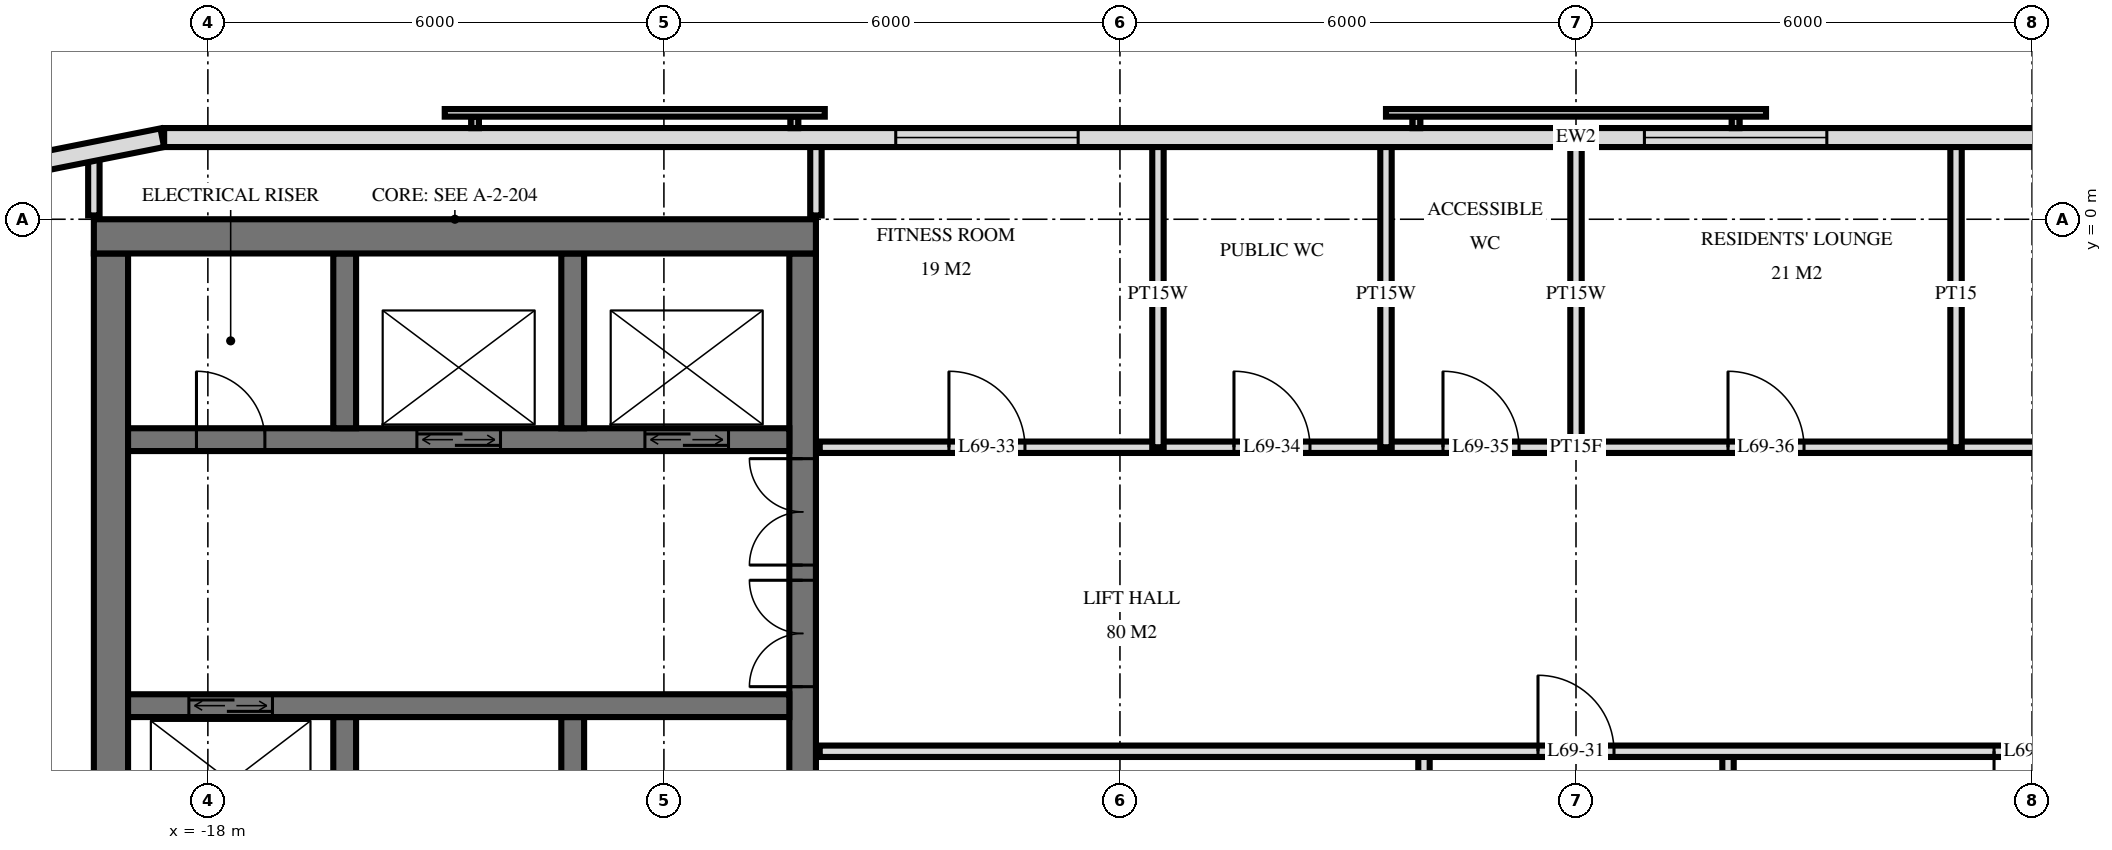
"""IFC4 building model, lengths in metres.
Left out: names, types, materials, properties, quantities, classifications, styles, units other than length and angle.
Written with IfcOpenShell. Run it as: python <this file> out.ifc"""

import sys

from ifc_helpers import new_model, si_unit, direction, frame, frame_2d, origin, place, context, subcontext, project, spatial, rectangle, extrude, element, fill, save


model = new_model("IFC4")
c1 = context("Model", 3, precision=1e-05, world=origin(), true_north=direction((0.0, 1.0)))
c2 = subcontext(c1, "Body", "Model", "MODEL_VIEW")
j1 = project(units=[si_unit("LENGTHUNIT", "METRE"), si_unit("PLANEANGLEUNIT", "RADIAN")], contexts=[c1])
p1 = place(None, origin())
s1 = spatial("IfcSite", under=j1, at=p1, CompositionType="ELEMENT")
p2 = place(p1, origin())
s2 = spatial("IfcBuilding", under=s1, at=p2, CompositionType="ELEMENT")
p3 = place(p2, frame((0.0, 0.0, 263.1)))
s3 = spatial("IfcBuildingStorey", under=s2, at=p3, CompositionType="ELEMENT", Elevation=263.1)
p4 = place(p3, frame((-19.5, -0.225, 0.0), z_axis=(0.0, 0.0, 1.0), x_axis=(1.0, 0.0, 0.0)))
e1 = element("IfcWall", 1, at=p4, inside=s3, PredefinedType="SHEAR", context=c2, shape_type="SweptSolid", body=[
    extrude(rectangle(XDim=9.5, YDim=0.45, at=frame_2d((4.75, 0.0))), origin(), (0.0, 0.0, 1.0), 3.5),
])
p5 = place(p3, frame((-10.175, -14.55, 0.0), z_axis=(0.0, 0.0, 1.0), x_axis=(0.0, 1.0, 0.0)))
e2 = element("IfcWall", 2, at=p5, inside=s3, PredefinedType="SHEAR", context=c2, shape_type="SweptSolid", body=[
    extrude(rectangle(XDim=14.1, YDim=0.35, at=frame_2d((7.05, 0.0))), origin(), (0.0, 0.0, 1.0), 3.5),
])
p6 = place(p5, frame((8.4, 0.0, 0.0)))
e3 = element("IfcOpeningElement", 3, at=p6, cuts=e2, PredefinedType="OPENING", context=c2, shape_type="SweptSolid", body=[
    extrude(rectangle(XDim=1.4, YDim=2.4, at=frame_2d((0.7, 1.2))), frame((0.0, 0.185, 0.0), z_axis=(0.0, -1.0, 0.0), x_axis=(1.0, 0.0, 0.0)), (0.0, 0.0, 1.0), 0.37),
])
p7 = place(p5, frame((10.0, 0.0, 0.0)))
e4 = element("IfcOpeningElement", 4, at=p7, cuts=e2, PredefinedType="OPENING", context=c2, shape_type="SweptSolid", body=[
    extrude(rectangle(XDim=1.4, YDim=2.4, at=frame_2d((0.7, 1.2))), frame((0.0, 0.185, 0.0), z_axis=(0.0, -1.0, 0.0), x_axis=(1.0, 0.0, 0.0)), (0.0, 0.0, 1.0), 0.37),
])
p8 = place(p5, frame((4.0, 0.0, 0.0)))
e5 = element("IfcOpeningElement", 5, at=p8, cuts=e2, PredefinedType="OPENING", context=c2, shape_type="SweptSolid", body=[
    extrude(rectangle(XDim=1.2, YDim=2.1, at=frame_2d((0.6, 1.05))), frame((0.0, 0.185, 0.0), z_axis=(0.0, -1.0, 0.0), x_axis=(1.0, 0.0, 0.0)), (0.0, 0.0, 1.0), 0.37),
])
p9 = place(p3, frame((-19.275, -14.55, 0.0), z_axis=(0.0, 0.0, 1.0), x_axis=(0.0, 1.0, 0.0)))
e6 = element("IfcWall", 6, at=p9, inside=s3, PredefinedType="SHEAR", context=c2, shape_type="SweptSolid", body=[
    extrude(rectangle(XDim=14.1, YDim=0.45, at=frame_2d((7.05, 0.0))), origin(), (0.0, 0.0, 1.0), 3.5),
])
p10 = place(p3, frame((-19.05, -2.9, 0.0), z_axis=(0.0, 0.0, 1.0), x_axis=(1.0, 0.0, 0.0)))
e7 = element("IfcWall", 7, at=p10, inside=s3, PredefinedType="SHEAR", context=c2, shape_type="SweptSolid", body=[
    extrude(rectangle(XDim=8.7, YDim=0.3, at=frame_2d((4.35, 0.0))), origin(), (0.0, 0.0, 1.0), 3.5),
])
p11 = place(p10, frame((6.8, 0.0, 0.0)))
e8 = element("IfcOpeningElement", 8, at=p11, cuts=e7, PredefinedType="OPENING", context=c2, shape_type="SweptSolid", body=[
    extrude(rectangle(XDim=1.1, YDim=2.1, at=frame_2d((0.55, 1.05))), frame((0.0, 0.16, 0.0), z_axis=(0.0, -1.0, 0.0), x_axis=(1.0, 0.0, 0.0)), (0.0, 0.0, 1.0), 0.32),
])
p12 = place(p10, frame((3.8, 0.0, 0.0)))
e9 = element("IfcOpeningElement", 9, at=p12, cuts=e7, PredefinedType="OPENING", context=c2, shape_type="SweptSolid", body=[
    extrude(rectangle(XDim=1.1, YDim=2.1, at=frame_2d((0.55, 1.05))), frame((0.0, 0.16, 0.0), z_axis=(0.0, -1.0, 0.0), x_axis=(1.0, 0.0, 0.0)), (0.0, 0.0, 1.0), 0.32),
])
p13 = place(p10, frame((0.9, 0.0, 0.0)))
e10 = element("IfcOpeningElement", 10, at=p13, cuts=e7, PredefinedType="OPENING", context=c2, shape_type="SweptSolid", body=[
    extrude(rectangle(XDim=0.9, YDim=2.1, at=frame_2d((0.45, 1.05))), frame((0.0, 0.16, 0.0), z_axis=(0.0, -1.0, 0.0), x_axis=(1.0, 0.0, 0.0)), (0.0, 0.0, 1.0), 0.32),
])
p14 = place(p3, frame((-19.05, -6.4, 0.0), z_axis=(0.0, 0.0, 1.0), x_axis=(1.0, 0.0, 0.0)))
e11 = element("IfcWall", 11, at=p14, inside=s3, PredefinedType="SHEAR", context=c2, shape_type="SweptSolid", body=[
    extrude(rectangle(XDim=8.7, YDim=0.3, at=frame_2d((4.35, 0.0))), origin(), (0.0, 0.0, 1.0), 3.5),
])
p15 = place(p14, frame((0.8, 0.0, 0.0)))
e12 = element("IfcOpeningElement", 12, at=p15, cuts=e11, PredefinedType="OPENING", context=c2, shape_type="SweptSolid", body=[
    extrude(rectangle(XDim=1.1, YDim=2.1, at=frame_2d((0.55, 1.05))), frame((0.0, 0.16, 0.0), z_axis=(0.0, -1.0, 0.0), x_axis=(1.0, 0.0, 0.0)), (0.0, 0.0, 1.0), 0.32),
])
for number, where, z_axis, x_axis in (
    (13, (-13.2, -2.75, 0.0), (0.0, 0.0, 1.0), (0.0, 1.0, 0.0)),
    (14, (-13.2, -8.85, 0.0), (0.0, 0.0, 1.0), (0.0, 1.0, 0.0)),
    (15, (-16.2, -2.75, 0.0), (0.0, 0.0, 1.0), (0.0, 1.0, 0.0)),
    (16, (-16.2, -8.85, 0.0), (0.0, 0.0, 1.0), (0.0, 1.0, 0.0)),
):
    element("IfcWall", number, at=place(p3, frame(where, z_axis=z_axis, x_axis=x_axis)), inside=s3, PredefinedType="SHEAR", context=c2, shape_type="SweptSolid", body=[
        extrude(rectangle(XDim=2.3, YDim=0.3, at=frame_2d((1.15, 0.0))), origin(), (0.0, 0.0, 1.0), 3.5),
    ])
p16 = place(p3, frame((18.575, 1.075, 0.0), z_axis=(0.0, 0.0, 1.0), x_axis=(-1.0, 0.0, 0.0)))
e17 = element("IfcWall", 17, at=p16, inside=s3, PredefinedType="SOLIDWALL", context=c2, shape_type="SweptSolid", body=[
    extrude(rectangle(XDim=37.151, YDim=0.25, at=frame_2d((18.575, 0.0))), origin(), (0.0, 0.0, 1.0), 3.22),
])
p17 = place(p16, frame((9.275, 0.0, 0.9)))
e18 = element("IfcOpeningElement", 18, at=p17, cuts=e17, PredefinedType="OPENING", context=c2, shape_type="SweptSolid", body=[
    extrude(rectangle(XDim=2.4, YDim=1.5, at=frame_2d((1.2, 0.75))), frame((0.0, 0.135, 0.0), z_axis=(0.0, -1.0, 0.0), x_axis=(1.0, 0.0, 0.0)), (0.0, 0.0, 1.0), 0.27),
])
p18 = place(p16, frame((15.275, 0.0, 0.9)))
e19 = element("IfcOpeningElement", 19, at=p18, cuts=e17, PredefinedType="OPENING", context=c2, shape_type="SweptSolid", body=[
    extrude(rectangle(XDim=2.4, YDim=1.5, at=frame_2d((1.2, 0.75))), frame((0.0, 0.135, 0.0), z_axis=(0.0, -1.0, 0.0), x_axis=(1.0, 0.0, 0.0)), (0.0, 0.0, 1.0), 0.27),
])
p19 = place(p16, frame((25.125, 0.0, 0.9)))
e20 = element("IfcOpeningElement", 20, at=p19, cuts=e17, PredefinedType="OPENING", context=c2, shape_type="SweptSolid", body=[
    extrude(rectangle(XDim=2.4, YDim=1.5, at=frame_2d((1.2, 0.75))), frame((0.0, 0.135, 0.0), z_axis=(0.0, -1.0, 0.0), x_axis=(1.0, 0.0, 0.0)), (0.0, 0.0, 1.0), 0.27),
])
p20 = place(p3, frame((-18.6, 1.073, 0.0), z_axis=(0.0, 0.0, 1.0), x_axis=(-0.980797896849, -0.195026884138, 0.0)))
e21 = element("IfcWall", 21, at=p20, inside=s3, PredefinedType="SOLIDWALL", context=c2, shape_type="SweptSolid", body=[
    extrude(rectangle(XDim=1.681, YDim=0.25, at=frame_2d((0.841, 0.0))), origin(), (0.0, 0.0, 1.0), 3.22),
])
p21 = place(p3, frame((5.0, -3.0, 0.0), z_axis=(0.0, 0.0, 1.0), x_axis=(0.0, 1.0, 0.0)))
e22 = element("IfcWall", 22, at=p21, inside=s3, PredefinedType="PARTITIONING", context=c2, shape_type="SweptSolid", body=[
    extrude(rectangle(XDim=4.02, YDim=0.15, at=frame_2d((2.01, 0.0))), origin(), (0.0, 0.0, 1.0), 3.22),
])
p22 = place(p3, frame((2.0, -11.0, 0.0), z_axis=(0.0, 0.0, 1.0), x_axis=(0.0, 1.0, 0.0)))
e23 = element("IfcWall", 23, at=p22, inside=s3, PredefinedType="PARTITIONING", context=c2, shape_type="SweptSolid", body=[
    extrude(rectangle(XDim=4.0, YDim=0.15, at=frame_2d((2.0, 0.0))), origin(), (0.0, 0.0, 1.0), 3.22),
])
p23 = place(p3, frame((0.0, -3.0, 0.0), z_axis=(0.0, 0.0, 1.0), x_axis=(0.0, 1.0, 0.0)))
e24 = element("IfcWall", 24, at=p23, inside=s3, PredefinedType="PLUMBINGWALL", context=c2, shape_type="SweptSolid", body=[
    extrude(rectangle(XDim=4.02, YDim=0.15, at=frame_2d((2.01, 0.0))), origin(), (0.0, 0.0, 1.0), 3.22),
])
p24 = place(p3, frame((-2.0, -11.0, 0.0), z_axis=(0.0, 0.0, 1.0), x_axis=(0.0, 1.0, 0.0)))
e25 = element("IfcWall", 25, at=p24, inside=s3, PredefinedType="PARTITIONING", context=c2, shape_type="SweptSolid", body=[
    extrude(rectangle(XDim=4.0, YDim=0.15, at=frame_2d((2.0, 0.0))), origin(), (0.0, 0.0, 1.0), 3.22),
])
for number, where, z_axis, x_axis in (
    (26, (-2.5, -3.0, 0.0), (0.0, 0.0, 1.0), (0.0, 1.0, 0.0)),
    (27, (-5.5, -3.0, 0.0), (0.0, 0.0, 1.0), (0.0, 1.0, 0.0)),
):
    element("IfcWall", number, at=place(p3, frame(where, z_axis=z_axis, x_axis=x_axis)), inside=s3, PredefinedType="PLUMBINGWALL", context=c2, shape_type="SweptSolid", body=[
        extrude(rectangle(XDim=4.02, YDim=0.15, at=frame_2d((2.01, 0.0))), origin(), (0.0, 0.0, 1.0), 3.22),
    ])
p25 = place(p3, frame((-10.0, 0.05, 0.0), z_axis=(0.0, 0.0, 1.0), x_axis=(0.0, 1.0, 0.0)))
e28 = element("IfcWall", 28, at=p25, inside=s3, PredefinedType="PARTITIONING", context=c2, shape_type="SweptSolid", body=[
    extrude(rectangle(XDim=0.97, YDim=0.15, at=frame_2d((0.485, 0.0))), origin(), (0.0, 0.0, 1.0), 3.22),
])
p26 = place(p3, frame((-19.5, 0.05, 0.0), z_axis=(0.0, 0.0, 1.0), x_axis=(0.0, 1.0, 0.0)))
e29 = element("IfcWall", 29, at=p26, inside=s3, PredefinedType="PARTITIONING", context=c2, shape_type="SweptSolid", body=[
    extrude(rectangle(XDim=0.787, YDim=0.15, at=frame_2d((0.394, 0.0))), origin(), (0.0, 0.0, 1.0), 3.22),
])
p27 = place(p3, frame((-9.95, -7.0, 0.0), z_axis=(0.0, 0.0, 1.0), x_axis=(1.0, 0.0, 0.0)))
e30 = element("IfcWall", 30, at=p27, inside=s3, PredefinedType="PARTITIONING", context=c2, shape_type="SweptSolid", body=[
    extrude(rectangle(XDim=19.9, YDim=0.15, at=frame_2d((9.95, 0.0))), origin(), (0.0, 0.0, 1.0), 3.22),
])
p28 = place(p27, frame((9.45, 0.0, 0.0)))
e31 = element("IfcOpeningElement", 31, at=p28, cuts=e30, PredefinedType="OPENING", context=c2, shape_type="SweptSolid", body=[
    extrude(rectangle(XDim=1.0, YDim=2.1, at=frame_2d((0.5, 1.05))), frame((0.0, 0.085, 0.0), z_axis=(0.0, -1.0, 0.0), x_axis=(1.0, 0.0, 0.0)), (0.0, 0.0, 1.0), 0.17),
])
p29 = place(p27, frame((15.45, 0.0, 0.0)))
e32 = element("IfcOpeningElement", 32, at=p29, cuts=e30, PredefinedType="OPENING", context=c2, shape_type="SweptSolid", body=[
    extrude(rectangle(XDim=1.0, YDim=2.1, at=frame_2d((0.5, 1.05))), frame((0.0, 0.085, 0.0), z_axis=(0.0, -1.0, 0.0), x_axis=(1.0, 0.0, 0.0)), (0.0, 0.0, 1.0), 0.17),
])
p30 = place(p3, frame((-9.95, -3.0, 0.0), z_axis=(0.0, 0.0, 1.0), x_axis=(1.0, 0.0, 0.0)))
e33 = element("IfcWall", 33, at=p30, inside=s3, PredefinedType="PARTITIONING", context=c2, shape_type="SweptSolid", body=[
    extrude(rectangle(XDim=19.9, YDim=0.15, at=frame_2d((9.95, 0.0))), origin(), (0.0, 0.0, 1.0), 3.22),
])
p31 = place(p30, frame((1.7, 0.0, 0.0)))
e34 = element("IfcOpeningElement", 34, at=p31, cuts=e33, PredefinedType="OPENING", context=c2, shape_type="SweptSolid", body=[
    extrude(rectangle(XDim=1.0, YDim=2.1, at=frame_2d((0.5, 1.05))), frame((0.0, 0.085, 0.0), z_axis=(0.0, -1.0, 0.0), x_axis=(1.0, 0.0, 0.0)), (0.0, 0.0, 1.0), 0.17),
])
p32 = place(p30, frame((5.45, 0.0, 0.0)))
e35 = element("IfcOpeningElement", 35, at=p32, cuts=e33, PredefinedType="OPENING", context=c2, shape_type="SweptSolid", body=[
    extrude(rectangle(XDim=1.0, YDim=2.1, at=frame_2d((0.5, 1.05))), frame((0.0, 0.085, 0.0), z_axis=(0.0, -1.0, 0.0), x_axis=(1.0, 0.0, 0.0)), (0.0, 0.0, 1.0), 0.17),
])
p33 = place(p30, frame((8.2, 0.0, 0.0)))
e36 = element("IfcOpeningElement", 36, at=p33, cuts=e33, PredefinedType="OPENING", context=c2, shape_type="SweptSolid", body=[
    extrude(rectangle(XDim=1.0, YDim=2.1, at=frame_2d((0.5, 1.05))), frame((0.0, 0.085, 0.0), z_axis=(0.0, -1.0, 0.0), x_axis=(1.0, 0.0, 0.0)), (0.0, 0.0, 1.0), 0.17),
])
p34 = place(p30, frame((11.95, 0.0, 0.0)))
e37 = element("IfcOpeningElement", 37, at=p34, cuts=e33, PredefinedType="OPENING", context=c2, shape_type="SweptSolid", body=[
    extrude(rectangle(XDim=1.0, YDim=2.1, at=frame_2d((0.5, 1.05))), frame((0.0, 0.085, 0.0), z_axis=(0.0, -1.0, 0.0), x_axis=(1.0, 0.0, 0.0)), (0.0, 0.0, 1.0), 0.17),
])
p35 = place(p30, frame((16.95, 0.0, 0.0)))
e38 = element("IfcOpeningElement", 38, at=p35, cuts=e33, PredefinedType="OPENING", context=c2, shape_type="SweptSolid", body=[
    extrude(rectangle(XDim=1.0, YDim=2.1, at=frame_2d((0.5, 1.05))), frame((0.0, 0.085, 0.0), z_axis=(0.0, -1.0, 0.0), x_axis=(1.0, 0.0, 0.0)), (0.0, 0.0, 1.0), 0.17),
])
p36 = place(p18, origin())
e39 = element("IfcWindow", 39, at=p36, inside=s3, PartitioningType="SINGLE_PANEL", PredefinedType="WINDOW", context=c2, shape_type="SweptSolid", body=[
    extrude(rectangle(XDim=2.4, YDim=1.5, at=frame_2d((1.2, 0.75))), frame((0.0, 0.03, 0.0), z_axis=(0.0, -1.0, 0.0), x_axis=(1.0, 0.0, 0.0)), (0.0, 0.0, 1.0), 0.06),
])
fill(e19, e39)
p37 = place(p19, origin())
e40 = element("IfcWindow", 40, at=p37, inside=s3, PartitioningType="SINGLE_PANEL", PredefinedType="WINDOW", context=c2, shape_type="SweptSolid", body=[
    extrude(rectangle(XDim=2.4, YDim=1.5, at=frame_2d((1.2, 0.75))), frame((0.0, 0.03, 0.0), z_axis=(0.0, -1.0, 0.0), x_axis=(1.0, 0.0, 0.0)), (0.0, 0.0, 1.0), 0.06),
])
fill(e20, e40)
p38 = place(p11, origin())
e41 = element("IfcDoor", 41, at=p38, inside=s3, OperationType="DOUBLE_DOOR_SLIDING", PredefinedType="USERDEFINED", context=c2, shape_type="SweptSolid", body=[
    extrude(rectangle(XDim=1.1, YDim=2.1, at=frame_2d((0.55, 1.05))), frame((0.0, 0.025, 0.0), z_axis=(0.0, -1.0, 0.0), x_axis=(1.0, 0.0, 0.0)), (0.0, 0.0, 1.0), 0.05),
])
fill(e8, e41)
p39 = place(p12, origin())
e42 = element("IfcDoor", 42, at=p39, inside=s3, OperationType="DOUBLE_DOOR_SLIDING", PredefinedType="USERDEFINED", context=c2, shape_type="SweptSolid", body=[
    extrude(rectangle(XDim=1.1, YDim=2.1, at=frame_2d((0.55, 1.05))), frame((0.0, 0.025, 0.0), z_axis=(0.0, -1.0, 0.0), x_axis=(1.0, 0.0, 0.0)), (0.0, 0.0, 1.0), 0.05),
])
fill(e9, e42)
p40 = place(p15, origin())
e43 = element("IfcDoor", 43, at=p40, inside=s3, OperationType="DOUBLE_DOOR_SLIDING", PredefinedType="USERDEFINED", context=c2, shape_type="SweptSolid", body=[
    extrude(rectangle(XDim=1.1, YDim=2.1, at=frame_2d((0.55, 1.05))), frame((0.0, 0.025, 0.0), z_axis=(0.0, -1.0, 0.0), x_axis=(1.0, 0.0, 0.0)), (0.0, 0.0, 1.0), 0.05),
])
fill(e12, e43)
p41 = place(p6, origin())
e44 = element("IfcDoor", 44, at=p41, inside=s3, OperationType="DOUBLE_DOOR_SINGLE_SWING", PredefinedType="DOOR", context=c2, shape_type="SweptSolid", body=[
    extrude(rectangle(XDim=1.4, YDim=2.4, at=frame_2d((0.7, 1.2))), frame((0.0, 0.025, 0.0), z_axis=(0.0, -1.0, 0.0), x_axis=(1.0, 0.0, 0.0)), (0.0, 0.0, 1.0), 0.05),
])
fill(e3, e44)
p42 = place(p7, origin())
e45 = element("IfcDoor", 45, at=p42, inside=s3, OperationType="DOUBLE_DOOR_SINGLE_SWING", PredefinedType="DOOR", context=c2, shape_type="SweptSolid", body=[
    extrude(rectangle(XDim=1.4, YDim=2.4, at=frame_2d((0.7, 1.2))), frame((0.0, 0.025, 0.0), z_axis=(0.0, -1.0, 0.0), x_axis=(1.0, 0.0, 0.0)), (0.0, 0.0, 1.0), 0.05),
])
fill(e4, e45)
p43 = place(p13, origin())
e46 = element("IfcDoor", 46, at=p43, inside=s3, OperationType="SINGLE_SWING_RIGHT", PredefinedType="DOOR", context=c2, shape_type="SweptSolid", body=[
    extrude(rectangle(XDim=0.9, YDim=2.1, at=frame_2d((0.45, 1.05))), frame((0.0, 0.025, 0.0), z_axis=(0.0, -1.0, 0.0), x_axis=(1.0, 0.0, 0.0)), (0.0, 0.0, 1.0), 0.05),
])
fill(e10, e46)
p44 = place(p28, origin())
e47 = element("IfcDoor", 47, at=p44, inside=s3, OperationType="SINGLE_SWING_RIGHT", PredefinedType="DOOR", context=c2, shape_type="SweptSolid", body=[
    extrude(rectangle(XDim=1.0, YDim=2.1, at=frame_2d((0.5, 1.05))), frame((0.0, 0.025, 0.0), z_axis=(0.0, -1.0, 0.0), x_axis=(1.0, 0.0, 0.0)), (0.0, 0.0, 1.0), 0.05),
])
fill(e31, e47)
p45 = place(p29, frame((0.5, 0.0, 0.0), z_axis=(0.0, 0.0, 1.0), x_axis=(-1.0, 0.0, 0.0)))
e48 = element("IfcDoor", 48, at=p45, inside=s3, OperationType="SINGLE_SWING_LEFT", PredefinedType="DOOR", context=c2, shape_type="SweptSolid", body=[
    extrude(rectangle(XDim=1.0, YDim=2.1, at=frame_2d((0.0, 1.05))), frame((0.0, -0.025, 0.0), z_axis=(0.0, 1.0, 0.0), x_axis=(-1.0, 0.0, 0.0)), (0.0, 0.0, 1.0), 0.05),
])
fill(e32, e48)
p46 = place(p31, origin())
e49 = element("IfcDoor", 49, at=p46, inside=s3, OperationType="SINGLE_SWING_RIGHT", PredefinedType="DOOR", context=c2, shape_type="SweptSolid", body=[
    extrude(rectangle(XDim=1.0, YDim=2.1, at=frame_2d((0.5, 1.05))), frame((0.0, 0.025, 0.0), z_axis=(0.0, -1.0, 0.0), x_axis=(1.0, 0.0, 0.0)), (0.0, 0.0, 1.0), 0.05),
])
fill(e34, e49)
p47 = place(p32, origin())
e50 = element("IfcDoor", 50, at=p47, inside=s3, OperationType="SINGLE_SWING_RIGHT", PredefinedType="DOOR", context=c2, shape_type="SweptSolid", body=[
    extrude(rectangle(XDim=1.0, YDim=2.1, at=frame_2d((0.5, 1.05))), frame((0.0, 0.025, 0.0), z_axis=(0.0, -1.0, 0.0), x_axis=(1.0, 0.0, 0.0)), (0.0, 0.0, 1.0), 0.05),
])
fill(e35, e50)
p48 = place(p33, origin())
e51 = element("IfcDoor", 51, at=p48, inside=s3, OperationType="SINGLE_SWING_RIGHT", PredefinedType="DOOR", context=c2, shape_type="SweptSolid", body=[
    extrude(rectangle(XDim=1.0, YDim=2.1, at=frame_2d((0.5, 1.05))), frame((0.0, 0.025, 0.0), z_axis=(0.0, -1.0, 0.0), x_axis=(1.0, 0.0, 0.0)), (0.0, 0.0, 1.0), 0.05),
])
fill(e36, e51)
p49 = place(p34, origin())
e52 = element("IfcDoor", 52, at=p49, inside=s3, OperationType="SINGLE_SWING_RIGHT", PredefinedType="DOOR", context=c2, shape_type="SweptSolid", body=[
    extrude(rectangle(XDim=1.0, YDim=2.1, at=frame_2d((0.5, 1.05))), frame((0.0, 0.025, 0.0), z_axis=(0.0, -1.0, 0.0), x_axis=(1.0, 0.0, 0.0)), (0.0, 0.0, 1.0), 0.05),
])
fill(e37, e52)
save(model, sys.argv[1])
